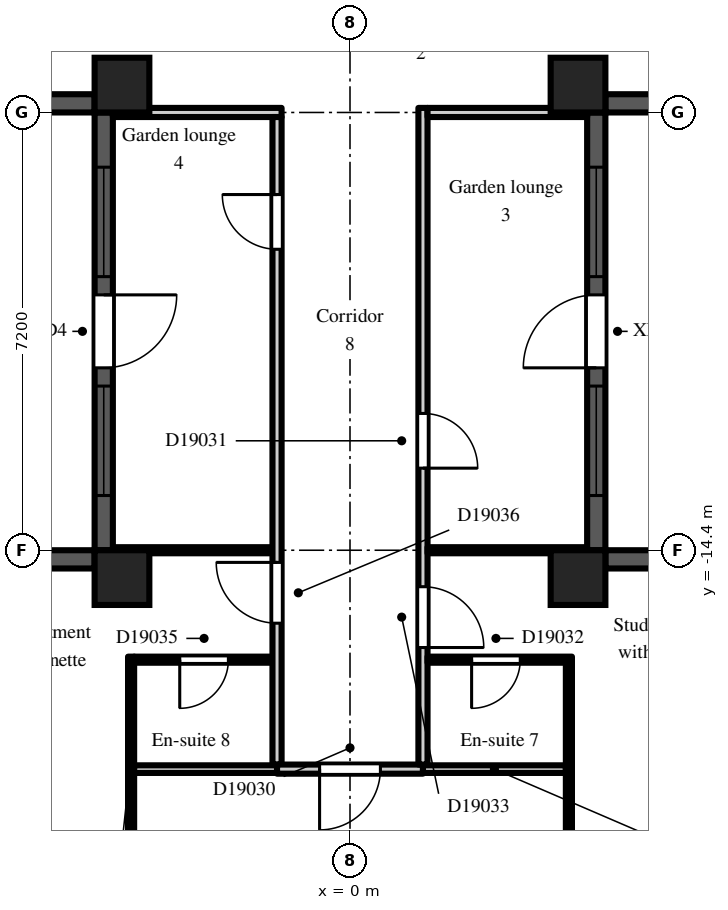
"""IFC4 building model, lengths in metres.
Left out: names, types, materials, properties, quantities, classifications, styles, units other than length and angle.
Written with IfcOpenShell. Run it as: python <this file> out.ifc"""

import sys

from ifc_helpers import new_model, si_unit, direction, frame, frame_2d, origin, origin_2d, place, context, subcontext, project, spatial, rectangle, extrude, element, fill, save


model = new_model("IFC4")
c1 = context("Model", 3, precision=1e-05, world=origin(), true_north=direction((0.0, 1.0)))
c2 = subcontext(c1, "Body", "Model", "MODEL_VIEW")
j1 = project(units=[si_unit("LENGTHUNIT", "METRE"), si_unit("PLANEANGLEUNIT", "RADIAN")], contexts=[c1])
p1 = place(None, origin())
s1 = spatial("IfcSite", under=j1, at=p1, CompositionType="ELEMENT")
p2 = place(p1, origin())
s2 = spatial("IfcBuilding", under=s1, at=p2, CompositionType="ELEMENT")
p3 = place(p2, frame((0.0, 0.0, 129.3)))
s3 = spatial("IfcBuildingStorey", under=s2, at=p3, CompositionType="ELEMENT", Elevation=129.3)
for number, where, z_axis, x_axis in (
    (1, (-3.75, -14.85, 0.0), (0.0, 0.0, 1.0), (1.0, 0.0, 0.0)),
    (2, (-3.75, -6.75, 0.0), (0.0, 0.0, 1.0), (1.0, 0.0, 0.0)),
    (3, (3.75, -14.85, 0.0), (0.0, 0.0, 1.0), (1.0, 0.0, 0.0)),
    (4, (3.75, -6.75, 0.0), (0.0, 0.0, 1.0), (1.0, 0.0, 0.0)),
):
    element("IfcColumn", number, at=place(p3, frame(where, z_axis=z_axis, x_axis=x_axis)), inside=s3, PredefinedType="COLUMN", context=c2, shape_type="SweptSolid", body=[
        extrude(rectangle(XDim=0.9, YDim=0.9, at=origin_2d()), origin(), (0.0, 0.0, 1.0), 3.0),
    ])
p4 = place(p3, frame((-7.2, -7.05, 0.0), z_axis=(0.0, 0.0, 1.0), x_axis=(1.0, 0.0, 0.0)))
e5 = element("IfcWall", 5, at=p4, inside=s3, PredefinedType="SOLIDWALL", context=c2, shape_type="SweptSolid", body=[
    extrude(rectangle(XDim=3.0, YDim=0.3, at=frame_2d((1.5, 0.0))), origin(), (0.0, 0.0, 1.0), 2.2),
])
p5 = place(p3, frame((-4.05, -7.2, 0.0), z_axis=(0.0, 0.0, 1.0), x_axis=(0.0, -1.0, 0.0)))
e6 = element("IfcWall", 6, at=p5, inside=s3, PredefinedType="SOLIDWALL", context=c2, shape_type="SweptSolid", body=[
    extrude(rectangle(XDim=7.2, YDim=0.3, at=frame_2d((3.6, 0.0))), origin(), (0.0, 0.0, 1.0), 2.2),
])
p6 = place(p5, frame((3.0, 0.0, 0.0)))
e7 = element("IfcOpeningElement", 7, at=p6, cuts=e6, PredefinedType="OPENING", context=c2, shape_type="SweptSolid", body=[
    extrude(rectangle(XDim=1.2, YDim=2.05, at=frame_2d((0.6, 1.025))), frame((0.0, 0.16, 0.0), z_axis=(0.0, -1.0, 0.0), x_axis=(1.0, 0.0, 0.0)), (0.0, 0.0, 1.0), 0.32),
])
p7 = place(p5, frame((0.9, 0.0, 0.2)))
e8 = element("IfcOpeningElement", 8, at=p7, cuts=e6, PredefinedType="OPENING", context=c2, shape_type="SweptSolid", body=[
    extrude(rectangle(XDim=1.8, YDim=1.85, at=frame_2d((0.9, 0.925))), frame((0.0, 0.16, 0.0), z_axis=(0.0, -1.0, 0.0), x_axis=(1.0, 0.0, 0.0)), (0.0, 0.0, 1.0), 0.32),
])
p8 = place(p5, frame((4.5, 0.0, 0.2)))
e9 = element("IfcOpeningElement", 9, at=p8, cuts=e6, PredefinedType="OPENING", context=c2, shape_type="SweptSolid", body=[
    extrude(rectangle(XDim=1.8, YDim=1.85, at=frame_2d((0.9, 0.925))), frame((0.0, 0.16, 0.0), z_axis=(0.0, -1.0, 0.0), x_axis=(1.0, 0.0, 0.0)), (0.0, 0.0, 1.0), 0.32),
])
for number, where, z_axis, x_axis in (
    (10, (-4.2, -14.55, 0.0), (0.0, 0.0, 1.0), (-1.0, 0.0, 0.0)),
    (11, (6.3, -14.55, 0.0), (0.0, 0.0, 1.0), (-1.0, 0.0, 0.0)),
):
    element("IfcWall", number, at=place(p3, frame(where, z_axis=z_axis, x_axis=x_axis)), inside=s3, PredefinedType="SOLIDWALL", context=c2, shape_type="SweptSolid", body=[
        extrude(rectangle(XDim=2.1, YDim=0.3, at=frame_2d((1.05, 0.0))), origin(), (0.0, 0.0, 1.0), 2.2),
    ])
p9 = place(p3, frame((4.05, -14.4, 0.0), z_axis=(0.0, 0.0, 1.0), x_axis=(0.0, 1.0, 0.0)))
e12 = element("IfcWall", 12, at=p9, inside=s3, PredefinedType="SOLIDWALL", context=c2, shape_type="SweptSolid", body=[
    extrude(rectangle(XDim=7.2, YDim=0.3, at=frame_2d((3.6, 0.0))), origin(), (0.0, 0.0, 1.0), 2.2),
])
p10 = place(p9, frame((3.0, 0.0, 0.0)))
e13 = element("IfcOpeningElement", 13, at=p10, cuts=e12, PredefinedType="OPENING", context=c2, shape_type="SweptSolid", body=[
    extrude(rectangle(XDim=1.2, YDim=2.05, at=frame_2d((0.6, 1.025))), frame((0.0, 0.16, 0.0), z_axis=(0.0, -1.0, 0.0), x_axis=(1.0, 0.0, 0.0)), (0.0, 0.0, 1.0), 0.32),
])
p11 = place(p9, frame((0.9, 0.0, 0.2)))
e14 = element("IfcOpeningElement", 14, at=p11, cuts=e12, PredefinedType="OPENING", context=c2, shape_type="SweptSolid", body=[
    extrude(rectangle(XDim=1.8, YDim=1.85, at=frame_2d((0.9, 0.925))), frame((0.0, 0.16, 0.0), z_axis=(0.0, -1.0, 0.0), x_axis=(1.0, 0.0, 0.0)), (0.0, 0.0, 1.0), 0.32),
])
p12 = place(p9, frame((4.5, 0.0, 0.2)))
e15 = element("IfcOpeningElement", 15, at=p12, cuts=e12, PredefinedType="OPENING", context=c2, shape_type="SweptSolid", body=[
    extrude(rectangle(XDim=1.8, YDim=1.85, at=frame_2d((0.9, 0.925))), frame((0.0, 0.16, 0.0), z_axis=(0.0, -1.0, 0.0), x_axis=(1.0, 0.0, 0.0)), (0.0, 0.0, 1.0), 0.32),
])
p13 = place(p3, frame((4.2, -7.05, 0.0), z_axis=(0.0, 0.0, 1.0), x_axis=(1.0, 0.0, 0.0)))
e16 = element("IfcWall", 16, at=p13, inside=s3, PredefinedType="SOLIDWALL", context=c2, shape_type="SweptSolid", body=[
    extrude(rectangle(XDim=3.0, YDim=0.3, at=frame_2d((1.5, 0.0))), origin(), (0.0, 0.0, 1.0), 2.2),
])
p14 = place(p3, frame((-3.9, -14.4, 0.0), z_axis=(0.0, 0.0, 1.0), x_axis=(1.0, 0.0, 0.0)))
e17 = element("IfcWall", 17, at=p14, inside=s3, PredefinedType="PARTITIONING", context=c2, shape_type="SweptSolid", body=[
    extrude(rectangle(XDim=2.625, YDim=0.1, at=frame_2d((1.312, 0.0))), origin(), (0.0, 0.0, 1.0), 2.6),
])
p15 = place(p3, frame((-3.9, -7.2, 0.0), z_axis=(0.0, 0.0, 1.0), x_axis=(1.0, 0.0, 0.0)))
e18 = element("IfcWall", 18, at=p15, inside=s3, PredefinedType="PARTITIONING", context=c2, shape_type="SweptSolid", body=[
    extrude(rectangle(XDim=2.775, YDim=0.15, at=frame_2d((1.387, 0.0))), origin(), (0.0, 0.0, 1.0), 2.6),
])
p16 = place(p3, frame((-3.6, -19.5, 0.0), z_axis=(0.0, 0.0, 1.0), x_axis=(0.0, 1.0, 0.0)))
e19 = element("IfcWall", 19, at=p16, inside=s3, PredefinedType="PARTITIONING", context=c2, shape_type="SweptSolid", body=[
    extrude(rectangle(XDim=3.35, YDim=0.1, at=frame_2d((1.675, 0.0))), origin(), (0.0, 0.0, 1.0), 2.6),
])
p17 = place(p3, frame((-3.55, -18.0, 0.0), z_axis=(0.0, 0.0, 1.0), x_axis=(1.0, 0.0, 0.0)))
e20 = element("IfcWall", 20, at=p17, inside=s3, PredefinedType="PARTITIONING", context=c2, shape_type="SweptSolid", body=[
    extrude(rectangle(XDim=2.35, YDim=0.125, at=frame_2d((1.175, 0.0))), origin(), (0.0, 0.0, 1.0), 2.6),
])
p18 = place(p3, frame((-3.55, -16.2, 0.0), z_axis=(0.0, 0.0, 1.0), x_axis=(1.0, 0.0, 0.0)))
e21 = element("IfcWall", 21, at=p18, inside=s3, PredefinedType="PARTITIONING", context=c2, shape_type="SweptSolid", body=[
    extrude(rectangle(XDim=2.275, YDim=0.1, at=frame_2d((1.138, 0.0))), origin(), (0.0, 0.0, 1.0), 2.6),
])
p19 = place(p18, frame((0.75, 0.0, 0.0)))
e22 = element("IfcOpeningElement", 22, at=p19, cuts=e21, PredefinedType="OPENING", context=c2, shape_type="SweptSolid", body=[
    extrude(rectangle(XDim=0.8, YDim=2.1, at=frame_2d((0.4, 1.05))), frame((0.0, 0.06, 0.0), z_axis=(0.0, -1.0, 0.0), x_axis=(1.0, 0.0, 0.0)), (0.0, 0.0, 1.0), 0.12),
])
p20 = place(p3, frame((-1.2, -17.925, 0.0), z_axis=(0.0, 0.0, 1.0), x_axis=(0.0, 1.0, 0.0)))
e23 = element("IfcWall", 23, at=p20, inside=s3, PredefinedType="PARTITIONING", context=c2, shape_type="SweptSolid", body=[
    extrude(rectangle(XDim=10.65, YDim=0.15, at=frame_2d((5.325, 0.0))), origin(), (0.0, 0.0, 1.0), 2.6),
])
p21 = place(p20, frame((8.475, 0.0, 0.0)))
e24 = element("IfcOpeningElement", 24, at=p21, cuts=e23, PredefinedType="OPENING", context=c2, shape_type="SweptSolid", body=[
    extrude(rectangle(XDim=0.9, YDim=2.1, at=frame_2d((0.45, 1.05))), frame((0.0, 0.085, 0.0), z_axis=(0.0, -1.0, 0.0), x_axis=(1.0, 0.0, 0.0)), (0.0, 0.0, 1.0), 0.17),
])
p22 = place(p20, frame((2.325, 0.0, 0.0)))
e25 = element("IfcOpeningElement", 25, at=p22, cuts=e23, PredefinedType="OPENING", context=c2, shape_type="SweptSolid", body=[
    extrude(rectangle(XDim=1.0, YDim=2.1, at=frame_2d((0.5, 1.05))), frame((0.0, 0.085, 0.0), z_axis=(0.0, -1.0, 0.0), x_axis=(1.0, 0.0, 0.0)), (0.0, 0.0, 1.0), 0.17),
])
p23 = place(p3, frame((-1.2, -18.0, 0.0), z_axis=(0.0, 0.0, 1.0), x_axis=(1.0, 0.0, 0.0)))
e26 = element("IfcWall", 26, at=p23, inside=s3, PredefinedType="PARTITIONING", context=c2, shape_type="SweptSolid", body=[
    extrude(rectangle(XDim=2.4, YDim=0.15, at=frame_2d((1.2, 0.0))), origin(), (0.0, 0.0, 1.0), 2.6),
])
p24 = place(p23, frame((0.7, 0.0, 0.0)))
e27 = element("IfcOpeningElement", 27, at=p24, cuts=e26, PredefinedType="OPENING", context=c2, shape_type="SweptSolid", body=[
    extrude(rectangle(XDim=1.0, YDim=2.1, at=frame_2d((0.5, 1.05))), frame((0.0, 0.085, 0.0), z_axis=(0.0, -1.0, 0.0), x_axis=(1.0, 0.0, 0.0)), (0.0, 0.0, 1.0), 0.17),
])
p25 = place(p3, frame((1.2, -17.925, 0.0), z_axis=(0.0, 0.0, 1.0), x_axis=(0.0, 1.0, 0.0)))
e28 = element("IfcWall", 28, at=p25, inside=s3, PredefinedType="PARTITIONING", context=c2, shape_type="SweptSolid", body=[
    extrude(rectangle(XDim=10.8, YDim=0.15, at=frame_2d((5.4, 0.0))), origin(), (0.0, 0.0, 1.0), 2.6),
])
p26 = place(p25, frame((4.875, 0.0, 0.0)))
e29 = element("IfcOpeningElement", 29, at=p26, cuts=e28, PredefinedType="OPENING", context=c2, shape_type="SweptSolid", body=[
    extrude(rectangle(XDim=0.9, YDim=2.1, at=frame_2d((0.45, 1.05))), frame((0.0, 0.085, 0.0), z_axis=(0.0, -1.0, 0.0), x_axis=(1.0, 0.0, 0.0)), (0.0, 0.0, 1.0), 0.17),
])
p27 = place(p25, frame((1.925, 0.0, 0.0)))
e30 = element("IfcOpeningElement", 30, at=p27, cuts=e28, PredefinedType="OPENING", context=c2, shape_type="SweptSolid", body=[
    extrude(rectangle(XDim=1.0, YDim=2.1, at=frame_2d((0.5, 1.05))), frame((0.0, 0.085, 0.0), z_axis=(0.0, -1.0, 0.0), x_axis=(1.0, 0.0, 0.0)), (0.0, 0.0, 1.0), 0.17),
])
p28 = place(p3, frame((1.2, -18.0, 0.0), z_axis=(0.0, 0.0, 1.0), x_axis=(1.0, 0.0, 0.0)))
e31 = element("IfcWall", 31, at=p28, inside=s3, PredefinedType="PARTITIONING", context=c2, shape_type="SweptSolid", body=[
    extrude(rectangle(XDim=2.35, YDim=0.125, at=frame_2d((1.175, 0.0))), origin(), (0.0, 0.0, 1.0), 2.6),
])
p29 = place(p3, frame((1.275, -16.2, 0.0), z_axis=(0.0, 0.0, 1.0), x_axis=(1.0, 0.0, 0.0)))
e32 = element("IfcWall", 32, at=p29, inside=s3, PredefinedType="PARTITIONING", context=c2, shape_type="SweptSolid", body=[
    extrude(rectangle(XDim=2.375, YDim=0.1, at=frame_2d((1.188, 0.0))), origin(), (0.0, 0.0, 1.0), 2.6),
])
p30 = place(p29, frame((0.725, 0.0, 0.0)))
e33 = element("IfcOpeningElement", 33, at=p30, cuts=e32, PredefinedType="OPENING", context=c2, shape_type="SweptSolid", body=[
    extrude(rectangle(XDim=0.8, YDim=2.1, at=frame_2d((0.4, 1.05))), frame((0.0, 0.06, 0.0), z_axis=(0.0, -1.0, 0.0), x_axis=(1.0, 0.0, 0.0)), (0.0, 0.0, 1.0), 0.12),
])
p31 = place(p3, frame((1.275, -14.4, 0.0), z_axis=(0.0, 0.0, 1.0), x_axis=(1.0, 0.0, 0.0)))
e34 = element("IfcWall", 34, at=p31, inside=s3, PredefinedType="PARTITIONING", context=c2, shape_type="SweptSolid", body=[
    extrude(rectangle(XDim=2.625, YDim=0.1, at=frame_2d((1.312, 0.0))), origin(), (0.0, 0.0, 1.0), 2.6),
])
p32 = place(p3, frame((1.275, -7.2, 0.0), z_axis=(0.0, 0.0, 1.0), x_axis=(1.0, 0.0, 0.0)))
e35 = element("IfcWall", 35, at=p32, inside=s3, PredefinedType="PARTITIONING", context=c2, shape_type="SweptSolid", body=[
    extrude(rectangle(XDim=2.625, YDim=0.15, at=frame_2d((1.312, 0.0))), origin(), (0.0, 0.0, 1.0), 2.6),
])
p33 = place(p3, frame((3.6, -19.5, 0.0), z_axis=(0.0, 0.0, 1.0), x_axis=(0.0, 1.0, 0.0)))
e36 = element("IfcWall", 36, at=p33, inside=s3, PredefinedType="PARTITIONING", context=c2, shape_type="SweptSolid", body=[
    extrude(rectangle(XDim=3.25, YDim=0.1, at=frame_2d((1.625, 0.0))), origin(), (0.0, 0.0, 1.0), 2.6),
])
p34 = place(p6, origin())
e37 = element("IfcDoor", 37, at=p34, inside=s3, OperationType="SINGLE_SWING_LEFT", PredefinedType="DOOR", context=c2, shape_type="SweptSolid", body=[
    extrude(rectangle(XDim=1.2, YDim=2.05, at=frame_2d((0.6, 1.025))), frame((0.0, 0.025, 0.0), z_axis=(0.0, -1.0, 0.0), x_axis=(1.0, 0.0, 0.0)), (0.0, 0.0, 1.0), 0.05),
])
fill(e7, e37)
p35 = place(p7, origin())
e38 = element("IfcWindow", 38, at=p35, inside=s3, PartitioningType="SINGLE_PANEL", PredefinedType="WINDOW", context=c2, shape_type="SweptSolid", body=[
    extrude(rectangle(XDim=1.8, YDim=1.85, at=frame_2d((0.9, 0.925))), frame((0.0, 0.03, 0.0), z_axis=(0.0, -1.0, 0.0), x_axis=(1.0, 0.0, 0.0)), (0.0, 0.0, 1.0), 0.06),
])
fill(e8, e38)
p36 = place(p8, origin())
e39 = element("IfcWindow", 39, at=p36, inside=s3, PartitioningType="SINGLE_PANEL", PredefinedType="WINDOW", context=c2, shape_type="SweptSolid", body=[
    extrude(rectangle(XDim=1.8, YDim=1.85, at=frame_2d((0.9, 0.925))), frame((0.0, 0.03, 0.0), z_axis=(0.0, -1.0, 0.0), x_axis=(1.0, 0.0, 0.0)), (0.0, 0.0, 1.0), 0.06),
])
fill(e9, e39)
p37 = place(p10, origin())
e40 = element("IfcDoor", 40, at=p37, inside=s3, OperationType="SINGLE_SWING_LEFT", PredefinedType="DOOR", context=c2, shape_type="SweptSolid", body=[
    extrude(rectangle(XDim=1.2, YDim=2.05, at=frame_2d((0.6, 1.025))), frame((0.0, 0.025, 0.0), z_axis=(0.0, -1.0, 0.0), x_axis=(1.0, 0.0, 0.0)), (0.0, 0.0, 1.0), 0.05),
])
fill(e13, e40)
p38 = place(p11, origin())
e41 = element("IfcWindow", 41, at=p38, inside=s3, PartitioningType="SINGLE_PANEL", PredefinedType="WINDOW", context=c2, shape_type="SweptSolid", body=[
    extrude(rectangle(XDim=1.8, YDim=1.85, at=frame_2d((0.9, 0.925))), frame((0.0, 0.03, 0.0), z_axis=(0.0, -1.0, 0.0), x_axis=(1.0, 0.0, 0.0)), (0.0, 0.0, 1.0), 0.06),
])
fill(e14, e41)
p39 = place(p12, origin())
e42 = element("IfcWindow", 42, at=p39, inside=s3, PartitioningType="SINGLE_PANEL", PredefinedType="WINDOW", context=c2, shape_type="SweptSolid", body=[
    extrude(rectangle(XDim=1.8, YDim=1.85, at=frame_2d((0.9, 0.925))), frame((0.0, 0.03, 0.0), z_axis=(0.0, -1.0, 0.0), x_axis=(1.0, 0.0, 0.0)), (0.0, 0.0, 1.0), 0.06),
])
fill(e15, e42)
p40 = place(p24, frame((1.0, 0.0, 0.0), z_axis=(0.0, 0.0, 1.0), x_axis=(-1.0, 0.0, 0.0)))
e43 = element("IfcDoor", 43, at=p40, inside=s3, OperationType="SINGLE_SWING_RIGHT", PredefinedType="DOOR", context=c2, shape_type="SweptSolid", body=[
    extrude(rectangle(XDim=1.0, YDim=2.1, at=frame_2d((0.5, 1.05))), frame((0.0, 0.025, 0.0), z_axis=(0.0, -1.0, 0.0), x_axis=(1.0, 0.0, 0.0)), (0.0, 0.0, 1.0), 0.05),
])
fill(e27, e43)
p41 = place(p26, frame((0.9, 0.0, 0.0), z_axis=(0.0, 0.0, 1.0), x_axis=(-1.0, 0.0, 0.0)))
e44 = element("IfcDoor", 44, at=p41, inside=s3, OperationType="SINGLE_SWING_RIGHT", PredefinedType="DOOR", context=c2, shape_type="SweptSolid", body=[
    extrude(rectangle(XDim=0.9, YDim=2.1, at=frame_2d((0.45, 1.05))), frame((0.0, 0.025, 0.0), z_axis=(0.0, -1.0, 0.0), x_axis=(1.0, 0.0, 0.0)), (0.0, 0.0, 1.0), 0.05),
])
fill(e29, e44)
p42 = place(p30, frame((0.8, 0.0, 0.0), z_axis=(0.0, 0.0, 1.0), x_axis=(-1.0, 0.0, 0.0)))
e45 = element("IfcDoor", 45, at=p42, inside=s3, OperationType="SINGLE_SWING_RIGHT", PredefinedType="DOOR", context=c2, shape_type="SweptSolid", body=[
    extrude(rectangle(XDim=0.8, YDim=2.1, at=frame_2d((0.4, 1.05))), frame((0.0, 0.025, 0.0), z_axis=(0.0, -1.0, 0.0), x_axis=(1.0, 0.0, 0.0)), (0.0, 0.0, 1.0), 0.05),
])
fill(e33, e45)
p43 = place(p27, frame((1.0, 0.0, 0.0), z_axis=(0.0, 0.0, 1.0), x_axis=(-1.0, 0.0, 0.0)))
e46 = element("IfcDoor", 46, at=p43, inside=s3, OperationType="SINGLE_SWING_RIGHT", PredefinedType="DOOR", context=c2, shape_type="SweptSolid", body=[
    extrude(rectangle(XDim=1.0, YDim=2.1, at=frame_2d((0.5, 1.05))), frame((0.0, 0.025, 0.0), z_axis=(0.0, -1.0, 0.0), x_axis=(1.0, 0.0, 0.0)), (0.0, 0.0, 1.0), 0.05),
])
fill(e30, e46)
p44 = place(p21, origin())
e47 = element("IfcDoor", 47, at=p44, inside=s3, OperationType="SINGLE_SWING_RIGHT", PredefinedType="DOOR", context=c2, shape_type="SweptSolid", body=[
    extrude(rectangle(XDim=0.9, YDim=2.1, at=frame_2d((0.45, 1.05))), frame((0.0, 0.025, 0.0), z_axis=(0.0, -1.0, 0.0), x_axis=(1.0, 0.0, 0.0)), (0.0, 0.0, 1.0), 0.05),
])
fill(e24, e47)
p45 = place(p19, frame((0.8, 0.0, 0.0), z_axis=(0.0, 0.0, 1.0), x_axis=(-1.0, 0.0, 0.0)))
e48 = element("IfcDoor", 48, at=p45, inside=s3, OperationType="SINGLE_SWING_RIGHT", PredefinedType="DOOR", context=c2, shape_type="SweptSolid", body=[
    extrude(rectangle(XDim=0.8, YDim=2.1, at=frame_2d((0.4, 1.05))), frame((0.0, 0.025, 0.0), z_axis=(0.0, -1.0, 0.0), x_axis=(1.0, 0.0, 0.0)), (0.0, 0.0, 1.0), 0.05),
])
fill(e22, e48)
p46 = place(p22, origin())
e49 = element("IfcDoor", 49, at=p46, inside=s3, OperationType="SINGLE_SWING_RIGHT", PredefinedType="DOOR", context=c2, shape_type="SweptSolid", body=[
    extrude(rectangle(XDim=1.0, YDim=2.1, at=frame_2d((0.5, 1.05))), frame((0.0, 0.025, 0.0), z_axis=(0.0, -1.0, 0.0), x_axis=(1.0, 0.0, 0.0)), (0.0, 0.0, 1.0), 0.05),
])
fill(e25, e49)
save(model, sys.argv[1])
